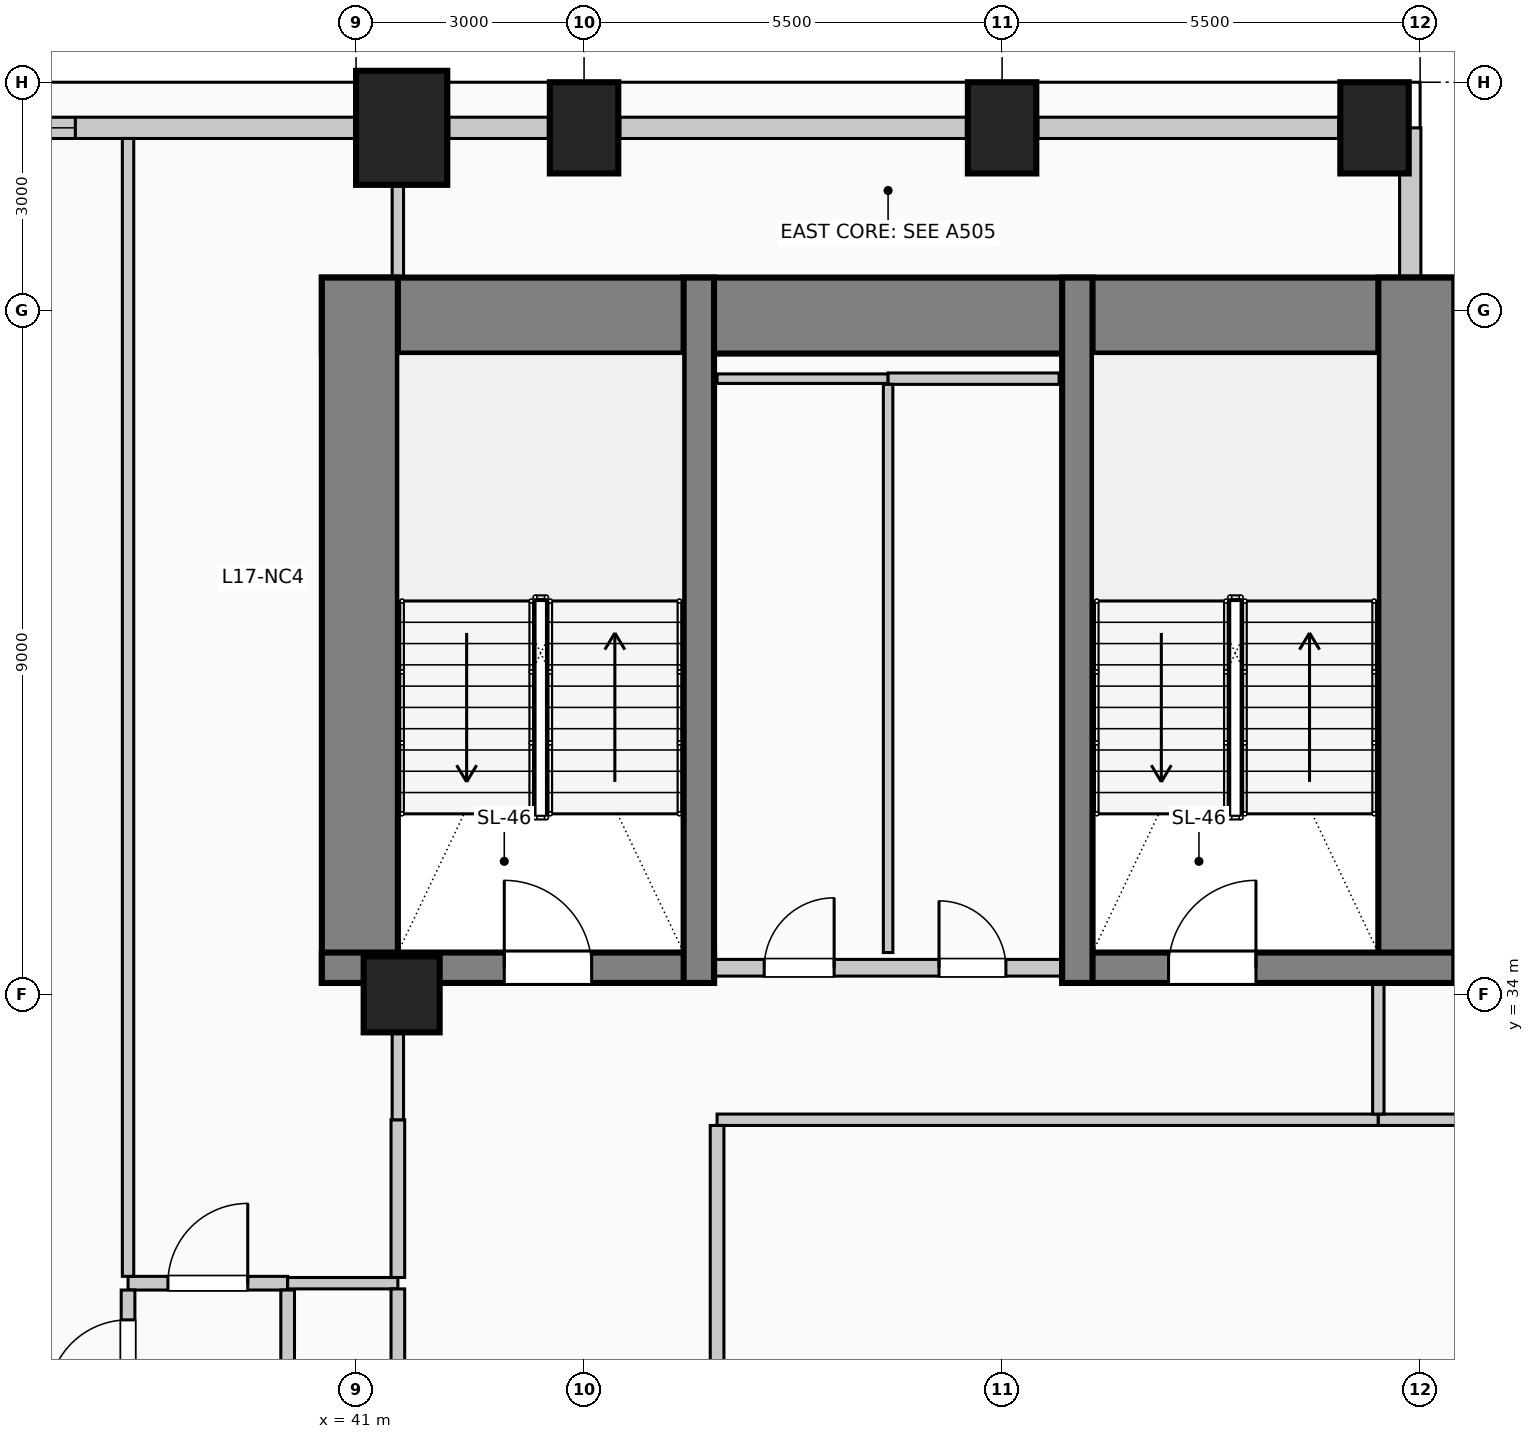
"""IFC4 building model, lengths in metres.
Left out: names, types, materials, properties, quantities, classifications, styles, units other than length and angle.
Written with IfcOpenShell. Run it as: python <this file> out.ifc"""

import sys

from ifc_helpers import new_model, si_unit, direction, frame, frame_2d, origin, origin_2d, place, context, subcontext, project, spatial, rectangle, circle, extrude, element, fill, save


model = new_model("IFC4")
c1 = context("Model", 3, precision=1e-05, world=origin(), true_north=direction((0.0, 1.0)))
c2 = subcontext(c1, "Body", "Model", "MODEL_VIEW")
j1 = project(units=[si_unit("LENGTHUNIT", "METRE"), si_unit("PLANEANGLEUNIT", "RADIAN")], contexts=[c1])
p1 = place(None, origin())
s1 = spatial("IfcSite", under=j1, at=p1, CompositionType="ELEMENT")
p2 = place(p1, origin())
s2 = spatial("IfcBuilding", under=s1, at=p2, CompositionType="ELEMENT")
p3 = place(p2, frame((0.0, 0.0, 70.6)))
s3 = spatial("IfcBuildingStorey", under=s2, at=p3, CompositionType="ELEMENT", Elevation=70.6)
p4 = place(p3, frame((40.55, 42.93, 0.0), z_axis=(0.0, 0.0, 1.0), x_axis=(1.0, 0.0, 0.0)))
e1 = element("IfcWall", 1, at=p4, inside=s3, PredefinedType="SHEAR", context=c2, shape_type="SweptSolid", body=[
    extrude(rectangle(XDim=14.9, YDim=1.0, at=frame_2d((7.45, 0.0))), origin(), (0.0, 0.0, 1.0), 4.0),
])
for number, where, z_axis, x_axis in (
    (2, (41.05, 34.15, 0.0), (0.0, 0.0, 1.0), (0.0, 1.0, 0.0)),
    (3, (54.95, 34.15, 0.0), (0.0, 0.0, 1.0), (0.0, 1.0, 0.0)),
):
    element("IfcWall", number, at=place(p3, frame(where, z_axis=z_axis, x_axis=x_axis)), inside=s3, PredefinedType="SHEAR", context=c2, shape_type="SweptSolid", body=[
        extrude(rectangle(XDim=9.28, YDim=1.0, at=frame_2d((4.64, 0.0))), origin(), (0.0, 0.0, 1.0), 4.0),
    ])
p5 = place(p3, frame((40.55, 34.35, 0.0), z_axis=(0.0, 0.0, 1.0), x_axis=(1.0, 0.0, 0.0)))
e4 = element("IfcWall", 4, at=p5, inside=s3, PredefinedType="SHEAR", context=c2, shape_type="SweptSolid", body=[
    extrude(rectangle(XDim=5.16, YDim=0.4, at=frame_2d((2.58, 0.0))), origin(), (0.0, 0.0, 1.0), 4.0),
])
p6 = place(p5, frame((2.4, 0.0, 0.0)))
e5 = element("IfcOpeningElement", 5, at=p6, cuts=e4, PredefinedType="OPENING", context=c2, shape_type="SweptSolid", body=[
    extrude(rectangle(XDim=1.15, YDim=2.2, at=frame_2d((0.575, 1.1))), frame((0.0, 0.21, 0.0), z_axis=(0.0, -1.0, 0.0), x_axis=(1.0, 0.0, 0.0)), (0.0, 0.0, 1.0), 0.42),
])
p7 = place(p3, frame((45.51, 34.15, 0.0), z_axis=(0.0, 0.0, 1.0), x_axis=(0.0, 1.0, 0.0)))
e6 = element("IfcWall", 6, at=p7, inside=s3, PredefinedType="SHEAR", context=c2, shape_type="SweptSolid", body=[
    extrude(rectangle(XDim=9.28, YDim=0.4, at=frame_2d((4.64, 0.0))), origin(), (0.0, 0.0, 1.0), 4.0),
])
p8 = place(p3, frame((50.29, 34.35, 0.0), z_axis=(0.0, 0.0, 1.0), x_axis=(1.0, 0.0, 0.0)))
e7 = element("IfcWall", 7, at=p8, inside=s3, PredefinedType="SHEAR", context=c2, shape_type="SweptSolid", body=[
    extrude(rectangle(XDim=5.16, YDim=0.4, at=frame_2d((2.58, 0.0))), origin(), (0.0, 0.0, 1.0), 4.0),
])
p9 = place(p8, frame((1.4, 0.0, 0.0)))
e8 = element("IfcOpeningElement", 8, at=p9, cuts=e7, PredefinedType="OPENING", context=c2, shape_type="SweptSolid", body=[
    extrude(rectangle(XDim=1.15, YDim=2.2, at=frame_2d((0.575, 1.1))), frame((0.0, 0.21, 0.0), z_axis=(0.0, -1.0, 0.0), x_axis=(1.0, 0.0, 0.0)), (0.0, 0.0, 1.0), 0.42),
])
p10 = place(p3, frame((50.49, 34.15, 0.0), z_axis=(0.0, 0.0, 1.0), x_axis=(0.0, 1.0, 0.0)))
e9 = element("IfcWall", 9, at=p10, inside=s3, PredefinedType="SHEAR", context=c2, shape_type="SweptSolid", body=[
    extrude(rectangle(XDim=9.28, YDim=0.4, at=frame_2d((4.64, 0.0))), origin(), (0.0, 0.0, 1.0), 4.0),
])
p11 = place(p3, frame((41.6, 45.4, 0.0), z_axis=(0.0, 0.0, 1.0), x_axis=(1.0, 0.0, 0.0)))
e10 = element("IfcColumn", 10, at=p11, inside=s3, PredefinedType="COLUMN", context=c2, shape_type="SweptSolid", body=[
    extrude(rectangle(XDim=1.2, YDim=1.5, at=origin_2d()), origin(), (0.0, 0.0, 1.0), 4.0),
])
for number, where, z_axis, x_axis in (
    (11, (44.0, 45.4, 0.0), (0.0, 0.0, 1.0), (1.0, 0.0, 0.0)),
    (12, (49.5, 45.4, 0.0), (0.0, 0.0, 1.0), (1.0, 0.0, 0.0)),
    (13, (54.4, 45.4, 0.0), (0.0, 0.0, 1.0), (1.0, 0.0, 0.0)),
):
    element("IfcColumn", number, at=place(p3, frame(where, z_axis=z_axis, x_axis=x_axis)), inside=s3, PredefinedType="COLUMN", context=c2, shape_type="SweptSolid", body=[
        extrude(rectangle(XDim=0.9, YDim=1.2, at=origin_2d()), origin(), (0.0, 0.0, 1.0), 4.0),
    ])
p12 = place(p3, frame((41.6, 34.0, 0.0), z_axis=(0.0, 0.0, 1.0), x_axis=(1.0, 0.0, 0.0)))
e14 = element("IfcColumn", 14, at=p12, inside=s3, PredefinedType="COLUMN", context=c2, shape_type="SweptSolid", body=[
    extrude(circle(Radius=0.5, at=origin_2d()), origin(), (0.0, 0.0, 1.0), 4.0),
])
p13 = place(p3, frame((34.62, 45.4, 0.0), z_axis=(0.0, 0.0, 1.0), x_axis=(1.0, 0.0, 0.0)))
e15 = element("IfcWall", 15, at=p13, inside=s3, PredefinedType="SOLIDWALL", context=c2, shape_type="SweptSolid", body=[
    extrude(rectangle(XDim=6.36, YDim=0.28, at=frame_2d((3.18, 0.0))), origin(), (0.0, 0.0, 1.0), 2.85),
])
p14 = place(p13, frame((0.987, 0.0, 0.5)))
e16 = element("IfcOpeningElement", 16, at=p14, cuts=e15, PredefinedType="OPENING", context=c2, shape_type="SweptSolid", body=[
    extrude(rectangle(XDim=1.7, YDim=1.95, at=frame_2d((0.85, 0.975))), frame((0.0, 0.15, 0.0), z_axis=(0.0, -1.0, 0.0), x_axis=(1.0, 0.0, 0.0)), (0.0, 0.0, 1.0), 0.3),
])
p15 = place(p3, frame((42.22, 45.4, 0.0), z_axis=(0.0, 0.0, 1.0), x_axis=(1.0, 0.0, 0.0)))
e17 = element("IfcWall", 17, at=p15, inside=s3, PredefinedType="SOLIDWALL", context=c2, shape_type="SweptSolid", body=[
    extrude(rectangle(XDim=1.31, YDim=0.28, at=frame_2d((0.655, 0.0))), origin(), (0.0, 0.0, 1.0), 2.85),
])
p16 = place(p3, frame((44.47, 45.4, 0.0), z_axis=(0.0, 0.0, 1.0), x_axis=(1.0, 0.0, 0.0)))
e18 = element("IfcWall", 18, at=p16, inside=s3, PredefinedType="SOLIDWALL", context=c2, shape_type="SweptSolid", body=[
    extrude(rectangle(XDim=4.56, YDim=0.28, at=frame_2d((2.28, 0.0))), origin(), (0.0, 0.0, 1.0), 2.85),
])
p17 = place(p3, frame((49.97, 45.4, 0.0), z_axis=(0.0, 0.0, 1.0), x_axis=(1.0, 0.0, 0.0)))
e19 = element("IfcWall", 19, at=p17, inside=s3, PredefinedType="SOLIDWALL", context=c2, shape_type="SweptSolid", body=[
    extrude(rectangle(XDim=3.96, YDim=0.28, at=frame_2d((1.98, 0.0))), origin(), (0.0, 0.0, 1.0), 2.85),
])
p18 = place(p3, frame((54.87, 45.4, 0.0), z_axis=(0.0, 0.0, 1.0), x_axis=(0.0, -1.0, 0.0)))
e20 = element("IfcWall", 20, at=p18, inside=s3, PredefinedType="SOLIDWALL", context=c2, shape_type="SweptSolid", body=[
    extrude(rectangle(XDim=1.965, YDim=0.28, at=frame_2d((0.982, 0.0))), origin(), (0.0, 0.0, 1.0), 3.7),
])
p19 = place(p3, frame((45.72, 34.35, 0.0), z_axis=(0.0, 0.0, 1.0), x_axis=(1.0, 0.0, 0.0)))
e21 = element("IfcWall", 21, at=p19, inside=s3, PredefinedType="PARTITIONING", context=c2, shape_type="SweptSolid", body=[
    extrude(rectangle(XDim=4.56, YDim=0.22, at=frame_2d((2.28, 0.0))), origin(), (0.0, 0.0, 1.0), 3.7),
])
p20 = place(p19, frame((0.65, 0.0, 0.0)))
e22 = element("IfcOpeningElement", 22, at=p20, cuts=e21, PredefinedType="OPENING", context=c2, shape_type="SweptSolid", body=[
    extrude(rectangle(XDim=0.92, YDim=2.1, at=frame_2d((0.46, 1.05))), frame((0.0, 0.12, 0.0), z_axis=(0.0, -1.0, 0.0), x_axis=(1.0, 0.0, 0.0)), (0.0, 0.0, 1.0), 0.24),
])
p21 = place(p19, frame((2.95, 0.0, 0.0)))
e23 = element("IfcOpeningElement", 23, at=p21, cuts=e21, PredefinedType="OPENING", context=c2, shape_type="SweptSolid", body=[
    extrude(rectangle(XDim=0.88, YDim=2.1, at=frame_2d((0.44, 1.05))), frame((0.0, 0.12, 0.0), z_axis=(0.0, -1.0, 0.0), x_axis=(1.0, 0.0, 0.0)), (0.0, 0.0, 1.0), 0.24),
])
p22 = place(p3, frame((38.0, 30.2, 0.0), z_axis=(0.0, 0.0, 1.0), x_axis=(1.0, 0.0, 0.0)))
e24 = element("IfcWall", 24, at=p22, inside=s3, PredefinedType="PARTITIONING", context=c2, shape_type="SweptSolid", body=[
    extrude(rectangle(XDim=2.1, YDim=0.18, at=frame_2d((1.05, 0.0))), origin(), (0.0, 0.0, 1.0), 3.7),
])
p23 = place(p22, frame((0.525, 0.0, 0.0)))
e25 = element("IfcOpeningElement", 25, at=p23, cuts=e24, PredefinedType="OPENING", context=c2, shape_type="SweptSolid", body=[
    extrude(rectangle(XDim=1.05, YDim=2.15, at=frame_2d((0.525, 1.075))), frame((0.0, 0.1, 0.0), z_axis=(0.0, -1.0, 0.0), x_axis=(1.0, 0.0, 0.0)), (0.0, 0.0, 1.0), 0.2),
])
p24 = place(p3, frame((40.1, 30.2, 0.0), z_axis=(0.0, 0.0, 1.0), x_axis=(1.0, 0.0, 0.0)))
e26 = element("IfcWall", 26, at=p24, inside=s3, PredefinedType="PARTITIONING", context=c2, shape_type="SweptSolid", body=[
    extrude(rectangle(XDim=1.45, YDim=0.15, at=frame_2d((0.725, 0.0))), origin(), (0.0, 0.0, 1.0), 3.7),
])
p25 = place(p3, frame((45.75, 32.35, 0.0), z_axis=(0.0, 0.0, 1.0), x_axis=(1.0, 0.0, 0.0)))
e27 = element("IfcWall", 27, at=p25, inside=s3, PredefinedType="PARTITIONING", context=c2, shape_type="SweptSolid", body=[
    extrude(rectangle(XDim=8.7, YDim=0.15, at=frame_2d((4.35, 0.0))), origin(), (0.0, 0.0, 1.0), 3.7),
])
p26 = place(p3, frame((54.45, 32.35, 0.0), z_axis=(0.0, 0.0, 1.0), x_axis=(1.0, 0.0, 0.0)))
e28 = element("IfcWall", 28, at=p26, inside=s3, PredefinedType="PARTITIONING", context=c2, shape_type="SweptSolid", body=[
    extrude(rectangle(XDim=2.81, YDim=0.15, at=frame_2d((1.405, 0.0))), origin(), (0.0, 0.0, 1.0), 3.7),
])
p27 = place(p3, frame((45.75, 42.1, 0.0), z_axis=(0.0, 0.0, 1.0), x_axis=(1.0, 0.0, 0.0)))
e29 = element("IfcWall", 29, at=p27, inside=s3, PredefinedType="PARTITIONING", context=c2, shape_type="SweptSolid", body=[
    extrude(rectangle(XDim=2.25, YDim=0.125, at=frame_2d((1.125, 0.0))), origin(), (0.0, 0.0, 1.0), 3.7),
])
p28 = place(p3, frame((48.0, 42.1, 0.0), z_axis=(0.0, 0.0, 1.0), x_axis=(1.0, 0.0, 0.0)))
e30 = element("IfcWall", 30, at=p28, inside=s3, PredefinedType="PARTITIONING", context=c2, shape_type="SweptSolid", body=[
    extrude(rectangle(XDim=2.25, YDim=0.15, at=frame_2d((1.125, 0.0))), origin(), (0.0, 0.0, 1.0), 3.7),
])
p29 = place(p3, frame((38.0, 28.275, 0.0), z_axis=(0.0, 0.0, 1.0), x_axis=(0.0, 1.0, 0.0)))
e31 = element("IfcWall", 31, at=p29, inside=s3, PredefinedType="PARTITIONING", context=c2, shape_type="SweptSolid", body=[
    extrude(rectangle(XDim=1.835, YDim=0.18, at=frame_2d((0.917, 0.0))), origin(), (0.0, 0.0, 1.0), 3.7),
])
p30 = place(p29, frame((0.393, 0.0, 0.0)))
e32 = element("IfcOpeningElement", 32, at=p30, cuts=e31, PredefinedType="OPENING", context=c2, shape_type="SweptSolid", body=[
    extrude(rectangle(XDim=1.05, YDim=2.15, at=frame_2d((0.525, 1.075))), frame((0.0, 0.1, 0.0), z_axis=(0.0, -1.0, 0.0), x_axis=(1.0, 0.0, 0.0)), (0.0, 0.0, 1.0), 0.2),
])
p31 = place(p3, frame((38.0, 30.29, 0.0), z_axis=(0.0, 0.0, 1.0), x_axis=(0.0, 1.0, 0.0)))
e33 = element("IfcWall", 33, at=p31, inside=s3, PredefinedType="PARTITIONING", context=c2, shape_type="SweptSolid", body=[
    extrude(rectangle(XDim=14.97, YDim=0.15, at=frame_2d((7.485, 0.0))), origin(), (0.0, 0.0, 1.0), 3.7),
])
p32 = place(p3, frame((40.1, 20.29, 0.0), z_axis=(0.0, 0.0, 1.0), x_axis=(0.0, 1.0, 0.0)))
e34 = element("IfcWall", 34, at=p32, inside=s3, PredefinedType="PARTITIONING", context=c2, shape_type="SweptSolid", body=[
    extrude(rectangle(XDim=9.82, YDim=0.18, at=frame_2d((4.91, 0.0))), origin(), (0.0, 0.0, 1.0), 3.7),
])
p33 = place(p3, frame((41.55, 20.29, 0.0), z_axis=(0.0, 0.0, 1.0), x_axis=(0.0, 1.0, 0.0)))
e35 = element("IfcWall", 35, at=p33, inside=s3, PredefinedType="PARTITIONING", context=c2, shape_type="SweptSolid", body=[
    extrude(rectangle(XDim=9.835, YDim=0.18, at=frame_2d((4.917, 0.0))), origin(), (0.0, 0.0, 1.0), 2.995),
])
p34 = place(p3, frame((41.55, 30.275, 0.0), z_axis=(0.0, 0.0, 1.0), x_axis=(0.0, 1.0, 0.0)))
e36 = element("IfcWall", 36, at=p34, inside=s3, PredefinedType="PARTITIONING", context=c2, shape_type="SweptSolid", body=[
    extrude(rectangle(XDim=2.075, YDim=0.18, at=frame_2d((1.038, 0.0))), origin(), (0.0, 0.0, 1.0), 2.995),
])
p35 = place(p3, frame((41.55, 32.35, 0.0), z_axis=(0.0, 0.0, 1.0), x_axis=(0.0, 1.0, 0.0)))
e37 = element("IfcWall", 37, at=p35, inside=s3, PredefinedType="PARTITIONING", context=c2, shape_type="SweptSolid", body=[
    extrude(rectangle(XDim=1.15, YDim=0.15, at=frame_2d((0.575, 0.0))), origin(), (0.0, 0.0, 1.0), 2.995),
])
p36 = place(p3, frame((41.55, 43.43, 0.0), z_axis=(0.0, 0.0, 1.0), x_axis=(0.0, 1.0, 0.0)))
e38 = element("IfcWall", 38, at=p36, inside=s3, PredefinedType="PARTITIONING", context=c2, shape_type="SweptSolid", body=[
    extrude(rectangle(XDim=1.22, YDim=0.15, at=frame_2d((0.61, 0.0))), origin(), (0.0, 0.0, 1.0), 3.7),
])
p37 = place(p3, frame((45.75, 20.29, 0.0), z_axis=(0.0, 0.0, 1.0), x_axis=(0.0, 1.0, 0.0)))
e39 = element("IfcWall", 39, at=p37, inside=s3, PredefinedType="PARTITIONING", context=c2, shape_type="SweptSolid", body=[
    extrude(rectangle(XDim=11.985, YDim=0.18, at=frame_2d((5.992, 0.0))), origin(), (0.0, 0.0, 1.0), 3.7),
])
p38 = place(p3, frame((48.0, 34.55, 0.0), z_axis=(0.0, 0.0, 1.0), x_axis=(0.0, 1.0, 0.0)))
e40 = element("IfcWall", 40, at=p38, inside=s3, PredefinedType="PARTITIONING", context=c2, shape_type="SweptSolid", body=[
    extrude(rectangle(XDim=7.475, YDim=0.125, at=frame_2d((3.737, 0.0))), origin(), (0.0, 0.0, 1.0), 3.7),
])
p39 = place(p3, frame((54.45, 32.425, 0.0), z_axis=(0.0, 0.0, 1.0), x_axis=(0.0, 1.0, 0.0)))
e41 = element("IfcWall", 41, at=p39, inside=s3, PredefinedType="PARTITIONING", context=c2, shape_type="SweptSolid", body=[
    extrude(rectangle(XDim=1.725, YDim=0.15, at=frame_2d((0.862, 0.0))), origin(), (0.0, 0.0, 1.0), 3.7),
])
p40 = place(p14, origin())
e42 = element("IfcWindow", 42, at=p40, inside=s3, PartitioningType="SINGLE_PANEL", PredefinedType="WINDOW", context=c2, shape_type="SweptSolid", body=[
    extrude(rectangle(XDim=1.7, YDim=1.95, at=frame_2d((0.85, 0.975))), frame((0.0, 0.03, 0.0), z_axis=(0.0, -1.0, 0.0), x_axis=(1.0, 0.0, 0.0)), (0.0, 0.0, 1.0), 0.06),
])
fill(e16, e42)
p41 = place(p6, origin())
e43 = element("IfcDoor", 43, at=p41, inside=s3, OperationType="SINGLE_SWING_LEFT", PredefinedType="DOOR", context=c2, shape_type="SweptSolid", body=[
    extrude(rectangle(XDim=1.15, YDim=2.2, at=frame_2d((0.575, 1.1))), frame((0.0, 0.025, 0.0), z_axis=(0.0, -1.0, 0.0), x_axis=(1.0, 0.0, 0.0)), (0.0, 0.0, 1.0), 0.05),
])
fill(e5, e43)
p42 = place(p20, origin())
e44 = element("IfcDoor", 44, at=p42, inside=s3, OperationType="SINGLE_SWING_RIGHT", PredefinedType="DOOR", context=c2, shape_type="SweptSolid", body=[
    extrude(rectangle(XDim=0.92, YDim=2.1, at=frame_2d((0.46, 1.05))), frame((0.0, 0.025, 0.0), z_axis=(0.0, -1.0, 0.0), x_axis=(1.0, 0.0, 0.0)), (0.0, 0.0, 1.0), 0.05),
])
fill(e22, e44)
p43 = place(p21, origin())
e45 = element("IfcDoor", 45, at=p43, inside=s3, OperationType="SINGLE_SWING_LEFT", PredefinedType="DOOR", context=c2, shape_type="SweptSolid", body=[
    extrude(rectangle(XDim=0.88, YDim=2.1, at=frame_2d((0.44, 1.05))), frame((0.0, 0.025, 0.0), z_axis=(0.0, -1.0, 0.0), x_axis=(1.0, 0.0, 0.0)), (0.0, 0.0, 1.0), 0.05),
])
fill(e23, e45)
p44 = place(p9, origin())
e46 = element("IfcDoor", 46, at=p44, inside=s3, OperationType="SINGLE_SWING_RIGHT", PredefinedType="DOOR", context=c2, shape_type="SweptSolid", body=[
    extrude(rectangle(XDim=1.15, YDim=2.2, at=frame_2d((0.575, 1.1))), frame((0.0, 0.025, 0.0), z_axis=(0.0, -1.0, 0.0), x_axis=(1.0, 0.0, 0.0)), (0.0, 0.0, 1.0), 0.05),
])
fill(e8, e46)
p45 = place(p23, origin())
e47 = element("IfcDoor", 47, at=p45, inside=s3, OperationType="SINGLE_SWING_RIGHT", PredefinedType="DOOR", context=c2, shape_type="SweptSolid", body=[
    extrude(rectangle(XDim=1.05, YDim=2.15, at=frame_2d((0.525, 1.075))), frame((0.0, 0.025, 0.0), z_axis=(0.0, -1.0, 0.0), x_axis=(1.0, 0.0, 0.0)), (0.0, 0.0, 1.0), 0.05),
])
fill(e25, e47)
p46 = place(p30, origin())
e48 = element("IfcDoor", 48, at=p46, inside=s3, OperationType="SINGLE_SWING_LEFT", PredefinedType="DOOR", context=c2, shape_type="SweptSolid", body=[
    extrude(rectangle(XDim=1.05, YDim=2.15, at=frame_2d((0.525, 1.075))), frame((0.0, 0.025, 0.0), z_axis=(0.0, -1.0, 0.0), x_axis=(1.0, 0.0, 0.0)), (0.0, 0.0, 1.0), 0.05),
])
fill(e32, e48)
save(model, sys.argv[1])
